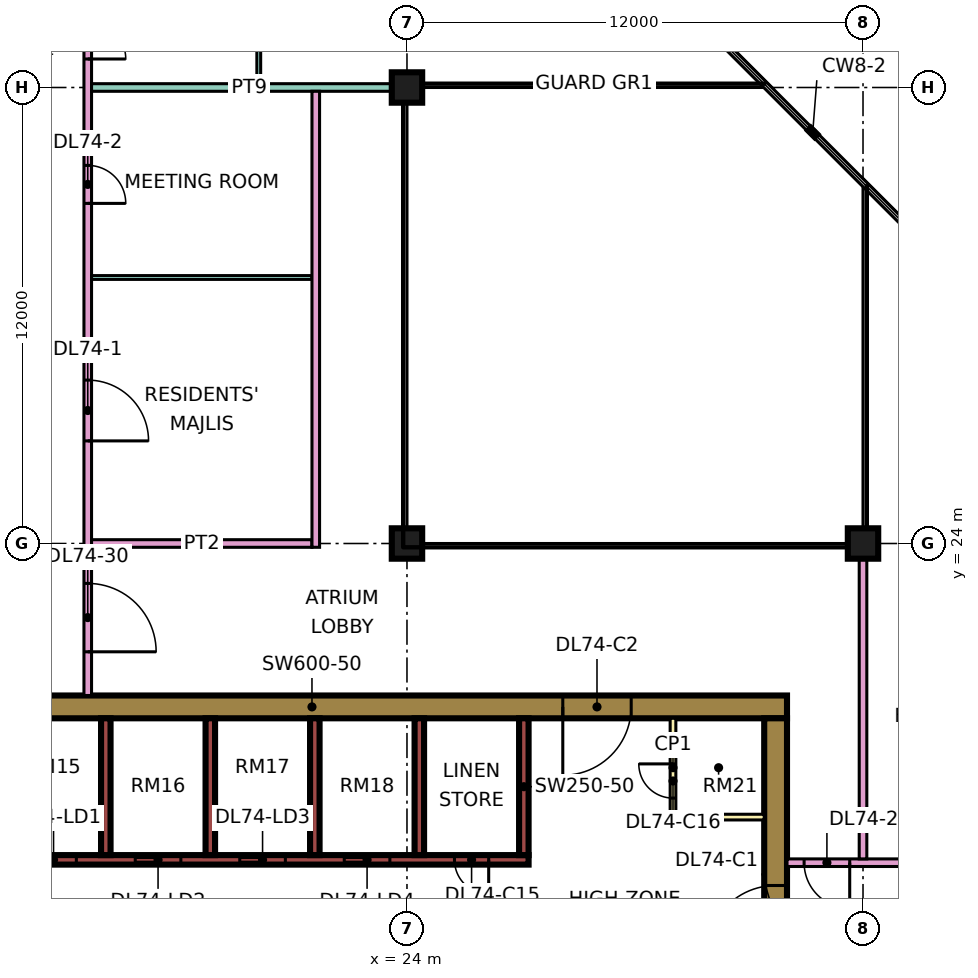
"""IFC4 building model, lengths in metres.
Left out: names, types, materials, properties, quantities, classifications, styles, units other than length and angle.
Written with IfcOpenShell. Run it as: python <this file> out.ifc"""

import sys

from ifc_helpers import new_model, si_unit, direction, frame, frame_2d, origin, origin_2d, place, context, subcontext, project, spatial, rectangle, extrude, element, fill, save


model = new_model("IFC4")
c1 = context("Model", 3, precision=1e-05, world=origin(), true_north=direction((0.0, 1.0)))
c2 = subcontext(c1, "Body", "Model", "MODEL_VIEW")
j1 = project(units=[si_unit("LENGTHUNIT", "METRE"), si_unit("PLANEANGLEUNIT", "RADIAN")], contexts=[c1])
p1 = place(None, origin())
s1 = spatial("IfcSite", under=j1, at=p1, CompositionType="ELEMENT")
p2 = place(p1, origin())
s2 = spatial("IfcBuilding", under=s1, at=p2, CompositionType="ELEMENT")
p3 = place(p2, frame((0.0, 0.0, 314.65)))
s3 = spatial("IfcBuildingStorey", under=s2, at=p3, CompositionType="ELEMENT", Elevation=314.65)
for number, where, z_axis, x_axis in (
    (1, (24.0, 24.0, 0.0), (0.0, 0.0, 1.0), (1.0, 0.0, 0.0)),
    (2, (24.0, 36.0, 0.0), (0.0, 0.0, 1.0), (1.0, 0.0, 0.0)),
    (3, (36.0, 24.0, 0.0), (0.0, 0.0, 1.0), (1.0, 0.0, 0.0)),
):
    element("IfcColumn", number, at=place(p3, frame(where, z_axis=z_axis, x_axis=x_axis)), inside=s3, PredefinedType="COLUMN", context=c2, shape_type="SweptSolid", body=[
        extrude(rectangle(XDim=0.8, YDim=0.8, at=origin_2d()), origin(), (0.0, 0.0, 1.0), 3.75),
    ])
p4 = place(p3, frame((9.0, 19.7, 0.0), z_axis=(0.0, 0.0, 1.0), x_axis=(1.0, 0.0, 0.0)))
e4 = element("IfcWall", 4, at=p4, inside=s3, PredefinedType="SHEAR", context=c2, shape_type="SweptSolid", body=[
    extrude(rectangle(XDim=25.0, YDim=0.6, at=frame_2d((12.5, 0.0))), origin(), (0.0, 0.0, 1.0), 3.75),
])
p5 = place(p4, frame((19.1, 0.0, 0.0)))
e5 = element("IfcOpeningElement", 5, at=p5, cuts=e4, PredefinedType="OPENING", context=c2, shape_type="SweptSolid", body=[
    extrude(rectangle(XDim=1.8, YDim=2.4, at=frame_2d((0.9, 1.2))), frame((0.0, 0.31, 0.0), z_axis=(0.0, -1.0, 0.0), x_axis=(1.0, 0.0, 0.0)), (0.0, 0.0, 1.0), 0.62),
])
p6 = place(p3, frame((33.7, 7.6, 0.0), z_axis=(0.0, 0.0, 1.0), x_axis=(0.0, 1.0, 0.0)))
e6 = element("IfcWall", 6, at=p6, inside=s3, PredefinedType="SHEAR", context=c2, shape_type="SweptSolid", body=[
    extrude(rectangle(XDim=11.8, YDim=0.6, at=frame_2d((5.9, 0.0))), origin(), (0.0, 0.0, 1.0), 3.75),
])
p7 = place(p6, frame((5.6, 0.0, 0.0)))
e7 = element("IfcOpeningElement", 7, at=p7, cuts=e6, PredefinedType="OPENING", context=c2, shape_type="SweptSolid", body=[
    extrude(rectangle(XDim=1.8, YDim=2.4, at=frame_2d((0.9, 1.2))), frame((0.0, 0.31, 0.0), z_axis=(0.0, -1.0, 0.0), x_axis=(1.0, 0.0, 0.0)), (0.0, 0.0, 1.0), 0.62),
])
p8 = place(p3, frame((13.45, 15.675, 0.0), z_axis=(0.0, 0.0, 1.0), x_axis=(1.0, 0.0, 0.0)))
e8 = element("IfcWall", 8, at=p8, inside=s3, PredefinedType="SHEAR", context=c2, shape_type="SweptSolid", body=[
    extrude(rectangle(XDim=13.75, YDim=0.25, at=frame_2d((6.875, 0.0))), origin(), (0.0, 0.0, 1.0), 3.75),
])
p9 = place(p8, frame((0.65, 0.0, 0.0)))
e9 = element("IfcOpeningElement", 9, at=p9, cuts=e8, PredefinedType="OPENING", context=c2, shape_type="SweptSolid", body=[
    extrude(rectangle(XDim=1.2, YDim=2.2, at=frame_2d((0.6, 1.1))), frame((0.0, 0.135, 0.0), z_axis=(0.0, -1.0, 0.0), x_axis=(1.0, 0.0, 0.0)), (0.0, 0.0, 1.0), 0.27),
])
p10 = place(p8, frame((3.4, 0.0, 0.0)))
e10 = element("IfcOpeningElement", 10, at=p10, cuts=e8, PredefinedType="OPENING", context=c2, shape_type="SweptSolid", body=[
    extrude(rectangle(XDim=1.2, YDim=2.2, at=frame_2d((0.6, 1.1))), frame((0.0, 0.135, 0.0), z_axis=(0.0, -1.0, 0.0), x_axis=(1.0, 0.0, 0.0)), (0.0, 0.0, 1.0), 0.27),
])
p11 = place(p8, frame((6.15, 0.0, 0.0)))
e11 = element("IfcOpeningElement", 11, at=p11, cuts=e8, PredefinedType="OPENING", context=c2, shape_type="SweptSolid", body=[
    extrude(rectangle(XDim=1.2, YDim=2.2, at=frame_2d((0.6, 1.1))), frame((0.0, 0.135, 0.0), z_axis=(0.0, -1.0, 0.0), x_axis=(1.0, 0.0, 0.0)), (0.0, 0.0, 1.0), 0.27),
])
p12 = place(p8, frame((8.9, 0.0, 0.0)))
e12 = element("IfcOpeningElement", 12, at=p12, cuts=e8, PredefinedType="OPENING", context=c2, shape_type="SweptSolid", body=[
    extrude(rectangle(XDim=1.2, YDim=2.2, at=frame_2d((0.6, 1.1))), frame((0.0, 0.135, 0.0), z_axis=(0.0, -1.0, 0.0), x_axis=(1.0, 0.0, 0.0)), (0.0, 0.0, 1.0), 0.27),
])
p13 = place(p8, frame((11.8, 0.0, 0.0)))
e13 = element("IfcOpeningElement", 13, at=p13, cuts=e8, PredefinedType="OPENING", context=c2, shape_type="SweptSolid", body=[
    extrude(rectangle(XDim=0.9, YDim=2.1, at=frame_2d((0.45, 1.05))), frame((0.0, 0.135, 0.0), z_axis=(0.0, -1.0, 0.0), x_axis=(1.0, 0.0, 0.0)), (0.0, 0.0, 1.0), 0.27),
])
for number, where, z_axis, x_axis in (
    (14, (16.075, 15.8, 0.0), (0.0, 0.0, 1.0), (0.0, 1.0, 0.0)),
    (15, (18.825, 15.8, 0.0), (0.0, 0.0, 1.0), (0.0, 1.0, 0.0)),
    (16, (21.575, 15.8, 0.0), (0.0, 0.0, 1.0), (0.0, 1.0, 0.0)),
    (17, (24.325, 15.8, 0.0), (0.0, 0.0, 1.0), (0.0, 1.0, 0.0)),
    (18, (27.075, 15.8, 0.0), (0.0, 0.0, 1.0), (0.0, 1.0, 0.0)),
):
    element("IfcWall", number, at=place(p3, frame(where, z_axis=z_axis, x_axis=x_axis)), inside=s3, PredefinedType="SHEAR", context=c2, shape_type="SweptSolid", body=[
        extrude(rectangle(XDim=3.6, YDim=0.25, at=frame_2d((1.8, 0.0))), origin(), (0.0, 0.0, 1.0), 3.75),
    ])
p14 = place(p3, frame((31.0, 16.8, 0.0), z_axis=(0.0, 0.0, 1.0), x_axis=(0.0, 1.0, 0.0)))
e19 = element("IfcWall", 19, at=p14, inside=s3, PredefinedType="PARTITIONING", context=c2, shape_type="SweptSolid", body=[
    extrude(rectangle(XDim=2.6, YDim=0.15, at=frame_2d((1.3, 0.0))), origin(), (0.0, 0.0, 1.0), 3.35),
])
p15 = place(p14, frame((0.5, 0.0, 0.0)))
e20 = element("IfcOpeningElement", 20, at=p15, cuts=e19, PredefinedType="OPENING", context=c2, shape_type="SweptSolid", body=[
    extrude(rectangle(XDim=0.9, YDim=2.1, at=frame_2d((0.45, 1.05))), frame((0.0, 0.085, 0.0), z_axis=(0.0, -1.0, 0.0), x_axis=(1.0, 0.0, 0.0)), (0.0, 0.0, 1.0), 0.17),
])
p16 = place(p3, frame((31.0, 16.8, 0.0), z_axis=(0.0, 0.0, 1.0), x_axis=(1.0, 0.0, 0.0)))
e21 = element("IfcWall", 21, at=p16, inside=s3, PredefinedType="PARTITIONING", context=c2, shape_type="SweptSolid", body=[
    extrude(rectangle(XDim=2.4, YDim=0.15, at=frame_2d((1.2, 0.0))), origin(), (0.0, 0.0, 1.0), 3.35),
])
p17 = place(p3, frame((15.6, 20.0, 0.0), z_axis=(0.0, 0.0, 1.0), x_axis=(0.0, 1.0, 0.0)))
e22 = element("IfcWall", 22, at=p17, inside=s3, PredefinedType="PARTITIONING", context=c2, shape_type="SweptSolid", body=[
    extrude(rectangle(XDim=27.775, YDim=0.2, at=frame_2d((13.887, 0.0))), origin(), (0.0, 0.0, 1.0), 3.35),
])
p18 = place(p17, frame((6.7, 0.0, 0.0)))
e23 = element("IfcOpeningElement", 23, at=p18, cuts=e22, PredefinedType="OPENING", context=c2, shape_type="SweptSolid", body=[
    extrude(rectangle(XDim=1.6, YDim=2.1, at=frame_2d((0.8, 1.05))), frame((0.0, 0.11, 0.0), z_axis=(0.0, -1.0, 0.0), x_axis=(1.0, 0.0, 0.0)), (0.0, 0.0, 1.0), 0.22),
])
p19 = place(p17, frame((12.95, 0.0, 0.0)))
e24 = element("IfcOpeningElement", 24, at=p19, cuts=e22, PredefinedType="OPENING", context=c2, shape_type="SweptSolid", body=[
    extrude(rectangle(XDim=1.0, YDim=2.1, at=frame_2d((0.5, 1.05))), frame((0.0, 0.11, 0.0), z_axis=(0.0, -1.0, 0.0), x_axis=(1.0, 0.0, 0.0)), (0.0, 0.0, 1.0), 0.22),
])
p20 = place(p17, frame((16.75, 0.0, 0.0)))
e25 = element("IfcOpeningElement", 25, at=p20, cuts=e22, PredefinedType="OPENING", context=c2, shape_type="SweptSolid", body=[
    extrude(rectangle(XDim=1.0, YDim=2.1, at=frame_2d((0.5, 1.05))), frame((0.0, 0.11, 0.0), z_axis=(0.0, -1.0, 0.0), x_axis=(1.0, 0.0, 0.0)), (0.0, 0.0, 1.0), 0.22),
])
p21 = place(p17, frame((1.15, 0.0, 0.0)))
e26 = element("IfcOpeningElement", 26, at=p21, cuts=e22, PredefinedType="OPENING", context=c2, shape_type="SweptSolid", body=[
    extrude(rectangle(XDim=1.8, YDim=2.1, at=frame_2d((0.9, 1.05))), frame((0.0, 0.11, 0.0), z_axis=(0.0, -1.0, 0.0), x_axis=(1.0, 0.0, 0.0)), (0.0, 0.0, 1.0), 0.22),
])
p22 = place(p17, frame((25.9, 0.0, 0.0)))
e27 = element("IfcOpeningElement", 27, at=p22, cuts=e22, PredefinedType="OPENING", context=c2, shape_type="SweptSolid", body=[
    extrude(rectangle(XDim=1.0, YDim=2.1, at=frame_2d((0.5, 1.05))), frame((0.0, 0.11, 0.0), z_axis=(0.0, -1.0, 0.0), x_axis=(1.0, 0.0, 0.0)), (0.0, 0.0, 1.0), 0.22),
])
p23 = place(p3, frame((15.7, 24.0, 0.0), z_axis=(0.0, 0.0, 1.0), x_axis=(1.0, 0.0, 0.0)))
e28 = element("IfcWall", 28, at=p23, inside=s3, PredefinedType="PARTITIONING", context=c2, shape_type="SweptSolid", body=[
    extrude(rectangle(XDim=5.8, YDim=0.2, at=frame_2d((2.9, 0.0))), origin(), (0.0, 0.0, 1.0), 3.35),
])
p24 = place(p3, frame((15.7, 31.0, 0.0), z_axis=(0.0, 0.0, 1.0), x_axis=(1.0, 0.0, 0.0)))
e29 = element("IfcWall", 29, at=p24, inside=s3, PredefinedType="PARTITIONING", context=c2, shape_type="SweptSolid", body=[
    extrude(rectangle(XDim=5.8, YDim=0.1, at=frame_2d((2.9, 0.0))), origin(), (0.0, 0.0, 1.0), 3.35),
])
p25 = place(p3, frame((15.7, 36.0, 0.0), z_axis=(0.0, 0.0, 1.0), x_axis=(1.0, 0.0, 0.0)))
e30 = element("IfcWall", 30, at=p25, inside=s3, PredefinedType="PARTITIONING", context=c2, shape_type="SweptSolid", body=[
    extrude(rectangle(XDim=8.3, YDim=0.2, at=frame_2d((4.15, 0.0))), origin(), (0.0, 0.0, 1.0), 3.35),
])
p26 = place(p3, frame((20.1, 36.1, 0.0), z_axis=(0.0, 0.0, 1.0), x_axis=(0.0, 1.0, 0.0)))
e31 = element("IfcWall", 31, at=p26, inside=s3, PredefinedType="PARTITIONING", context=c2, shape_type="SweptSolid", body=[
    extrude(rectangle(XDim=5.95, YDim=0.1, at=frame_2d((2.975, 0.0))), origin(), (0.0, 0.0, 1.0), 3.35),
])
p27 = place(p26, frame((0.95, 0.0, 0.0)))
e32 = element("IfcOpeningElement", 32, at=p27, cuts=e31, PredefinedType="OPENING", context=c2, shape_type="SweptSolid", body=[
    extrude(rectangle(XDim=0.9, YDim=2.1, at=frame_2d((0.45, 1.05))), frame((0.0, 0.06, 0.0), z_axis=(0.0, -1.0, 0.0), x_axis=(1.0, 0.0, 0.0)), (0.0, 0.0, 1.0), 0.12),
])
p28 = place(p26, frame((3.95, 0.0, 0.0)))
e33 = element("IfcOpeningElement", 33, at=p28, cuts=e31, PredefinedType="OPENING", context=c2, shape_type="SweptSolid", body=[
    extrude(rectangle(XDim=0.9, YDim=2.1, at=frame_2d((0.45, 1.05))), frame((0.0, 0.06, 0.0), z_axis=(0.0, -1.0, 0.0), x_axis=(1.0, 0.0, 0.0)), (0.0, 0.0, 1.0), 0.12),
])
p29 = place(p3, frame((21.6, 23.9, 0.0), z_axis=(0.0, 0.0, 1.0), x_axis=(0.0, 1.0, 0.0)))
e34 = element("IfcWall", 34, at=p29, inside=s3, PredefinedType="PARTITIONING", context=c2, shape_type="SweptSolid", body=[
    extrude(rectangle(XDim=12.0, YDim=0.2, at=frame_2d((6.0, 0.0))), origin(), (0.0, 0.0, 1.0), 3.35),
])
p30 = place(p3, frame((34.0, 15.6, 0.0), z_axis=(0.0, 0.0, 1.0), x_axis=(1.0, 0.0, 0.0)))
e35 = element("IfcWall", 35, at=p30, inside=s3, PredefinedType="PARTITIONING", context=c2, shape_type="SweptSolid", body=[
    extrude(rectangle(XDim=10.35, YDim=0.2, at=frame_2d((5.175, 0.0))), origin(), (0.0, 0.0, 1.0), 3.35),
])
p31 = place(p30, frame((5.6, 0.0, 0.0)))
e36 = element("IfcOpeningElement", 36, at=p31, cuts=e35, PredefinedType="OPENING", context=c2, shape_type="SweptSolid", body=[
    extrude(rectangle(XDim=1.0, YDim=2.1, at=frame_2d((0.5, 1.05))), frame((0.0, 0.11, 0.0), z_axis=(0.0, -1.0, 0.0), x_axis=(1.0, 0.0, 0.0)), (0.0, 0.0, 1.0), 0.22),
])
p32 = place(p30, frame((0.45, 0.0, 0.0)))
e37 = element("IfcOpeningElement", 37, at=p32, cuts=e35, PredefinedType="OPENING", context=c2, shape_type="SweptSolid", body=[
    extrude(rectangle(XDim=1.2, YDim=2.1, at=frame_2d((0.6, 1.05))), frame((0.0, 0.11, 0.0), z_axis=(0.0, -1.0, 0.0), x_axis=(1.0, 0.0, 0.0)), (0.0, 0.0, 1.0), 0.22),
])
p33 = place(p3, frame((36.0, 15.7, 0.0), z_axis=(0.0, 0.0, 1.0), x_axis=(0.0, 1.0, 0.0)))
e38 = element("IfcWall", 38, at=p33, inside=s3, PredefinedType="PARTITIONING", context=c2, shape_type="SweptSolid", body=[
    extrude(rectangle(XDim=8.3, YDim=0.2, at=frame_2d((4.15, 0.0))), origin(), (0.0, 0.0, 1.0), 3.35),
])
p34 = place(p9, origin())
e39 = element("IfcDoor", 39, at=p34, inside=s3, OperationType="DOUBLE_DOOR_SLIDING", PredefinedType="DOOR", context=c2, shape_type="SweptSolid", body=[
    extrude(rectangle(XDim=1.2, YDim=2.2, at=frame_2d((0.6, 1.1))), frame((0.0, 0.025, 0.0), z_axis=(0.0, -1.0, 0.0), x_axis=(1.0, 0.0, 0.0)), (0.0, 0.0, 1.0), 0.05),
])
fill(e9, e39)
p35 = place(p10, origin())
e40 = element("IfcDoor", 40, at=p35, inside=s3, OperationType="DOUBLE_DOOR_SLIDING", PredefinedType="DOOR", context=c2, shape_type="SweptSolid", body=[
    extrude(rectangle(XDim=1.2, YDim=2.2, at=frame_2d((0.6, 1.1))), frame((0.0, 0.025, 0.0), z_axis=(0.0, -1.0, 0.0), x_axis=(1.0, 0.0, 0.0)), (0.0, 0.0, 1.0), 0.05),
])
fill(e10, e40)
p36 = place(p11, origin())
e41 = element("IfcDoor", 41, at=p36, inside=s3, OperationType="DOUBLE_DOOR_SLIDING", PredefinedType="DOOR", context=c2, shape_type="SweptSolid", body=[
    extrude(rectangle(XDim=1.2, YDim=2.2, at=frame_2d((0.6, 1.1))), frame((0.0, 0.025, 0.0), z_axis=(0.0, -1.0, 0.0), x_axis=(1.0, 0.0, 0.0)), (0.0, 0.0, 1.0), 0.05),
])
fill(e11, e41)
p37 = place(p12, origin())
e42 = element("IfcDoor", 42, at=p37, inside=s3, OperationType="DOUBLE_DOOR_SLIDING", PredefinedType="DOOR", context=c2, shape_type="SweptSolid", body=[
    extrude(rectangle(XDim=1.2, YDim=2.2, at=frame_2d((0.6, 1.1))), frame((0.0, 0.025, 0.0), z_axis=(0.0, -1.0, 0.0), x_axis=(1.0, 0.0, 0.0)), (0.0, 0.0, 1.0), 0.05),
])
fill(e12, e42)
p38 = place(p7, origin())
e43 = element("IfcDoor", 43, at=p38, inside=s3, OperationType="DOUBLE_DOOR_SINGLE_SWING", PredefinedType="DOOR", context=c2, shape_type="SweptSolid", body=[
    extrude(rectangle(XDim=1.8, YDim=2.4, at=frame_2d((0.9, 1.2))), frame((0.0, 0.025, 0.0), z_axis=(0.0, -1.0, 0.0), x_axis=(1.0, 0.0, 0.0)), (0.0, 0.0, 1.0), 0.05),
])
fill(e7, e43)
p39 = place(p5, frame((1.8, 0.0, 0.0), z_axis=(0.0, 0.0, 1.0), x_axis=(-1.0, 0.0, 0.0)))
e44 = element("IfcDoor", 44, at=p39, inside=s3, OperationType="DOUBLE_DOOR_SINGLE_SWING", PredefinedType="DOOR", context=c2, shape_type="SweptSolid", body=[
    extrude(rectangle(XDim=1.8, YDim=2.4, at=frame_2d((0.9, 1.2))), frame((0.0, 0.025, 0.0), z_axis=(0.0, -1.0, 0.0), x_axis=(1.0, 0.0, 0.0)), (0.0, 0.0, 1.0), 0.05),
])
fill(e5, e44)
p40 = place(p13, origin())
e45 = element("IfcDoor", 45, at=p40, inside=s3, OperationType="SINGLE_SWING_RIGHT", PredefinedType="DOOR", context=c2, shape_type="SweptSolid", body=[
    extrude(rectangle(XDim=0.9, YDim=2.1, at=frame_2d((0.45, 1.05))), frame((0.0, 0.025, 0.0), z_axis=(0.0, -1.0, 0.0), x_axis=(1.0, 0.0, 0.0)), (0.0, 0.0, 1.0), 0.05),
])
fill(e13, e45)
p41 = place(p15, frame((0.9, 0.0, 0.0), z_axis=(0.0, 0.0, 1.0), x_axis=(-1.0, 0.0, 0.0)))
e46 = element("IfcDoor", 46, at=p41, inside=s3, OperationType="SINGLE_SWING_RIGHT", PredefinedType="DOOR", context=c2, shape_type="SweptSolid", body=[
    extrude(rectangle(XDim=0.9, YDim=2.1, at=frame_2d((0.45, 1.05))), frame((0.0, 0.025, 0.0), z_axis=(0.0, -1.0, 0.0), x_axis=(1.0, 0.0, 0.0)), (0.0, 0.0, 1.0), 0.05),
])
fill(e20, e46)
p42 = place(p18, frame((1.6, 0.0, 0.0), z_axis=(0.0, 0.0, 1.0), x_axis=(-1.0, 0.0, 0.0)))
e47 = element("IfcDoor", 47, at=p42, inside=s3, OperationType="DOUBLE_DOOR_SINGLE_SWING", PredefinedType="DOOR", context=c2, shape_type="SweptSolid", body=[
    extrude(rectangle(XDim=1.6, YDim=2.1, at=frame_2d((0.8, 1.05))), frame((0.0, 0.025, 0.0), z_axis=(0.0, -1.0, 0.0), x_axis=(1.0, 0.0, 0.0)), (0.0, 0.0, 1.0), 0.05),
])
fill(e23, e47)
p43 = place(p19, frame((1.0, 0.0, 0.0), z_axis=(0.0, 0.0, 1.0), x_axis=(-1.0, 0.0, 0.0)))
e48 = element("IfcDoor", 48, at=p43, inside=s3, OperationType="SINGLE_SWING_LEFT", PredefinedType="DOOR", context=c2, shape_type="SweptSolid", body=[
    extrude(rectangle(XDim=1.0, YDim=2.1, at=frame_2d((0.5, 1.05))), frame((0.0, 0.025, 0.0), z_axis=(0.0, -1.0, 0.0), x_axis=(1.0, 0.0, 0.0)), (0.0, 0.0, 1.0), 0.05),
])
fill(e24, e48)
p44 = place(p20, frame((1.0, 0.0, 0.0), z_axis=(0.0, 0.0, 1.0), x_axis=(-1.0, 0.0, 0.0)))
e49 = element("IfcDoor", 49, at=p44, inside=s3, OperationType="SINGLE_SWING_LEFT", PredefinedType="DOOR", context=c2, shape_type="SweptSolid", body=[
    extrude(rectangle(XDim=1.0, YDim=2.1, at=frame_2d((0.5, 1.05))), frame((0.0, 0.025, 0.0), z_axis=(0.0, -1.0, 0.0), x_axis=(1.0, 0.0, 0.0)), (0.0, 0.0, 1.0), 0.05),
])
fill(e25, e49)
p45 = place(p32, origin())
e50 = element("IfcDoor", 50, at=p45, inside=s3, OperationType="SINGLE_SWING_RIGHT", PredefinedType="DOOR", context=c2, shape_type="SweptSolid", body=[
    extrude(rectangle(XDim=1.2, YDim=2.1, at=frame_2d((0.6, 1.05))), frame((0.0, 0.025, 0.0), z_axis=(0.0, -1.0, 0.0), x_axis=(1.0, 0.0, 0.0)), (0.0, 0.0, 1.0), 0.05),
])
fill(e37, e50)
p46 = place(p21, frame((1.8, 0.0, 0.0), z_axis=(0.0, 0.0, 1.0), x_axis=(-1.0, 0.0, 0.0)))
e51 = element("IfcDoor", 51, at=p46, inside=s3, OperationType="DOUBLE_DOOR_SINGLE_SWING", PredefinedType="DOOR", context=c2, shape_type="SweptSolid", body=[
    extrude(rectangle(XDim=1.8, YDim=2.1, at=frame_2d((0.9, 1.05))), frame((0.0, 0.025, 0.0), z_axis=(0.0, -1.0, 0.0), x_axis=(1.0, 0.0, 0.0)), (0.0, 0.0, 1.0), 0.05),
])
fill(e26, e51)
save(model, sys.argv[1])
